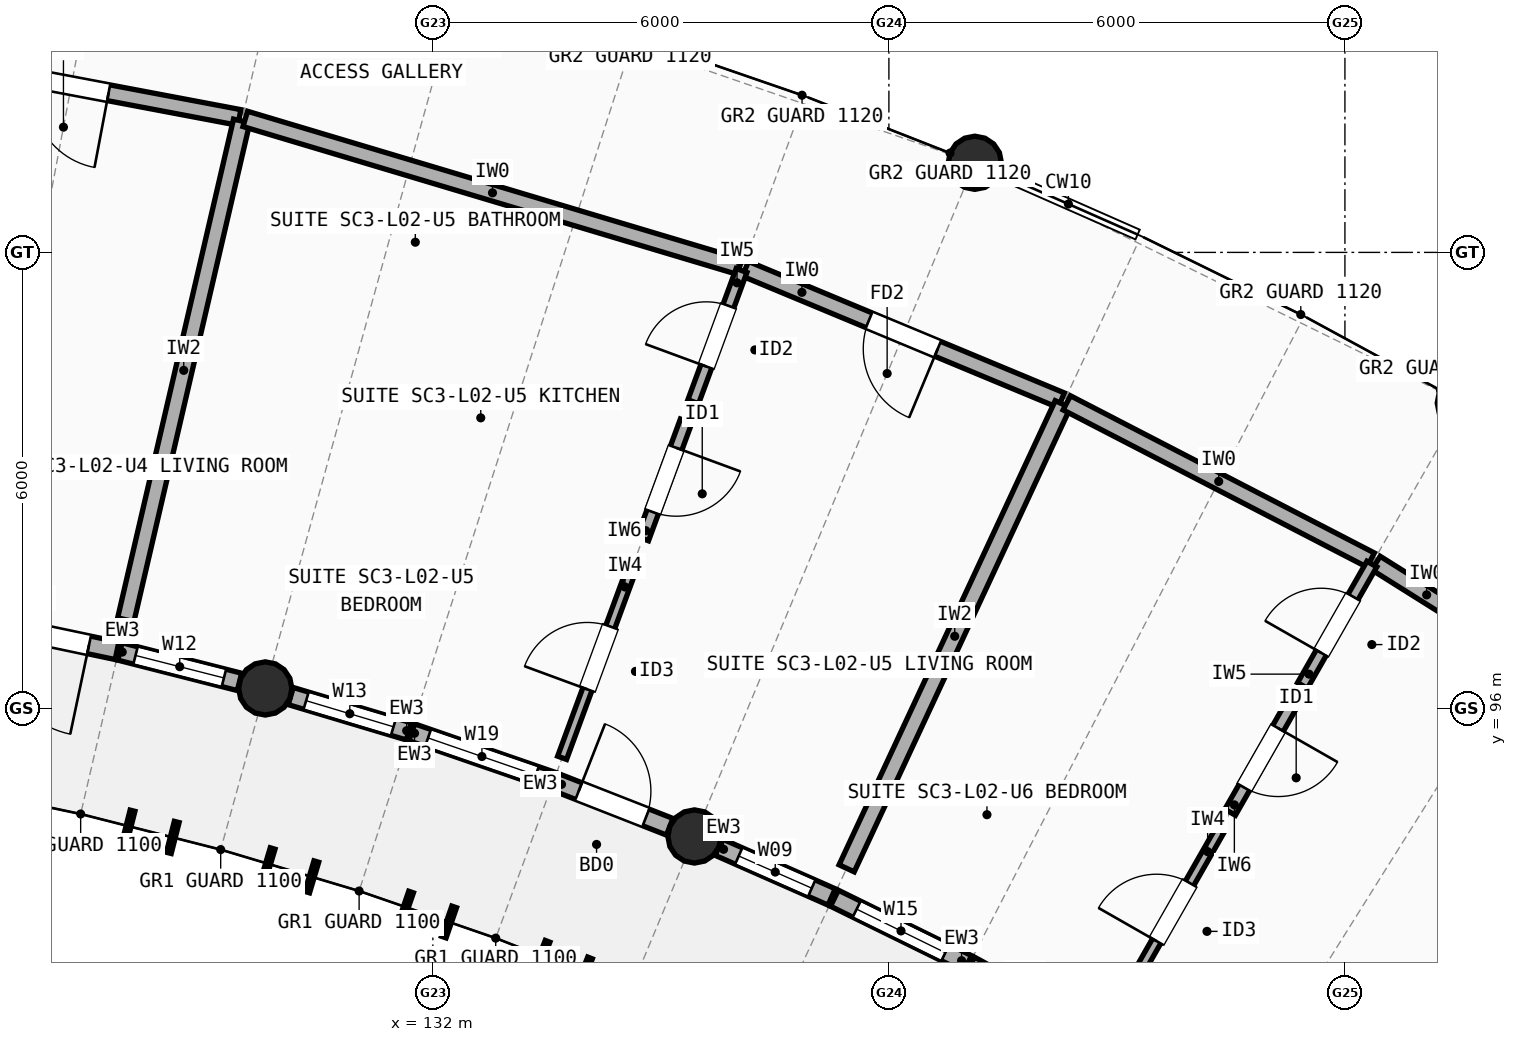
"""IFC4 building model, lengths in metres.
Left out: names, types, materials, properties, quantities, classifications, styles, units other than length and angle.
Written with IfcOpenShell. Run it as: python <this file> out.ifc"""

import sys

from ifc_helpers import new_model, si_unit, direction, frame, frame_2d, origin, origin_2d, place, context, subcontext, project, spatial, rectangle, circle, extrude, element, fill, save


model = new_model("IFC4")
c1 = context("Model", 3, precision=1e-05, world=origin(), true_north=direction((0.0, 1.0)))
c2 = subcontext(c1, "Body", "Model", "MODEL_VIEW")
j1 = project(units=[si_unit("LENGTHUNIT", "METRE"), si_unit("PLANEANGLEUNIT", "RADIAN")], contexts=[c1])
p1 = place(None, origin())
s1 = spatial("IfcSite", under=j1, at=p1, CompositionType="ELEMENT")
p2 = place(p1, origin())
s2 = spatial("IfcBuilding", under=s1, at=p2, CompositionType="ELEMENT")
p3 = place(p2, frame((0.0, 0.0, 7.7)))
s3 = spatial("IfcBuildingStorey", under=s2, at=p3, CompositionType="ELEMENT", Elevation=7.7)
for number, where, z_axis, x_axis in (
    (1, (129.795, 96.263, 0.0), (0.0, 0.0, 1.0), (1.0, 0.0, 0.0)),
    (2, (135.442, 94.316, 0.0), (0.0, 0.0, 1.0), (1.0, 0.0, 0.0)),
    (3, (139.13, 103.179, 0.0), (0.0, 0.0, 1.0), (1.0, 0.0, 0.0)),
    (4, (145.564, 100.018, 0.0), (0.0, 0.0, 1.0), (1.0, 0.0, 0.0)),
):
    element("IfcColumn", number, at=place(p3, frame(where, z_axis=z_axis, x_axis=x_axis)), inside=s3, PredefinedType="COLUMN", context=c2, shape_type="SweptSolid", body=[
        extrude(circle(Radius=0.35, at=origin_2d()), origin(), (0.0, 0.0, 1.0), 2.948),
    ])
p4 = place(p3, frame((125.934, 97.161, 0.0), z_axis=(0.0, 0.0, 1.0), x_axis=(0.978533860292, -0.206086108851, 0.0)))
e5 = element("IfcWall", 5, at=p4, inside=s3, PredefinedType="STANDARD", context=c2, shape_type="SweptSolid", body=[
    extrude(rectangle(XDim=1.952, YDim=0.235, at=frame_2d((0.976, 0.0))), origin(), (0.0, 0.0, 1.0), 2.684),
])
p5 = place(p4, frame((0.376, 0.0, 0.0)))
e6 = element("IfcOpeningElement", 6, at=p5, cuts=e5, PredefinedType="OPENING", context=c2, shape_type="SweptSolid", body=[
    extrude(rectangle(XDim=1.2, YDim=2.15, at=frame_2d((0.6, 1.075))), frame((0.0, 0.127, 0.0), z_axis=(0.0, -1.0, 0.0), x_axis=(1.0, 0.0, 0.0)), (0.0, 0.0, 1.0), 0.255),
])
p6 = place(p3, frame((127.883, 96.75, 0.0), z_axis=(0.0, 0.0, 1.0), x_axis=(0.969142943716, -0.246499400902, 0.0)))
e7 = element("IfcWall", 7, at=p6, inside=s3, PredefinedType="STANDARD", context=c2, shape_type="SweptSolid", body=[
    extrude(rectangle(XDim=1.622, YDim=0.235, at=frame_2d((0.811, 0.0))), origin(), (0.0, 0.0, 1.0), 2.684),
])
p7 = place(p6, frame((0.211, 0.0, 0.85)))
e8 = element("IfcOpeningElement", 8, at=p7, cuts=e7, PredefinedType="OPENING", context=c2, shape_type="SweptSolid", body=[
    extrude(rectangle(XDim=1.2, YDim=1.35, at=frame_2d((0.6, 0.675))), frame((0.0, 0.127, 0.0), z_axis=(0.0, -1.0, 0.0), x_axis=(1.0, 0.0, 0.0)), (0.0, 0.0, 1.0), 0.255),
])
p8 = place(p3, frame((130.13, 96.163, 0.0), z_axis=(0.0, 0.0, 1.0), x_axis=(0.958078548486, -0.286505662999, 0.0)))
e9 = element("IfcWall", 9, at=p8, inside=s3, PredefinedType="STANDARD", context=c2, shape_type="SweptSolid", body=[
    extrude(rectangle(XDim=1.623, YDim=0.235, at=frame_2d((0.811, 0.0))), origin(), (0.0, 0.0, 1.0), 2.684),
])
p9 = place(p8, frame((0.211, 0.0, 0.85)))
e10 = element("IfcOpeningElement", 10, at=p9, cuts=e9, PredefinedType="OPENING", context=c2, shape_type="SweptSolid", body=[
    extrude(rectangle(XDim=1.2, YDim=1.45, at=frame_2d((0.6, 0.725))), frame((0.0, 0.127, 0.0), z_axis=(0.0, -1.0, 0.0), x_axis=(1.0, 0.0, 0.0)), (0.0, 0.0, 1.0), 0.255),
])
p10 = place(p3, frame((131.722, 95.686, 0.0), z_axis=(0.0, 0.0, 1.0), x_axis=(0.945368994877, -0.326002244662, 0.0)))
e11 = element("IfcWall", 11, at=p10, inside=s3, PredefinedType="STANDARD", context=c2, shape_type="SweptSolid", body=[
    extrude(rectangle(XDim=1.952, YDim=0.235, at=frame_2d((0.976, 0.0))), origin(), (0.0, 0.0, 1.0), 2.684),
])
p11 = place(p10, frame((0.226, 0.0, 0.85)))
e12 = element("IfcOpeningElement", 12, at=p11, cuts=e11, PredefinedType="OPENING", context=c2, shape_type="SweptSolid", body=[
    extrude(rectangle(XDim=1.5, YDim=1.5, at=frame_2d((0.75, 0.75))), frame((0.0, 0.127, 0.0), z_axis=(0.0, -1.0, 0.0), x_axis=(1.0, 0.0, 0.0)), (0.0, 0.0, 1.0), 0.255),
])
p12 = place(p3, frame((133.606, 95.036, 0.0), z_axis=(0.0, 0.0, 1.0), x_axis=(0.931038371221, -0.364921294684, 0.0)))
e13 = element("IfcWall", 13, at=p12, inside=s3, PredefinedType="STANDARD", context=c2, shape_type="SweptSolid", body=[
    extrude(rectangle(XDim=1.622, YDim=0.235, at=frame_2d((0.811, 0.0))), origin(), (0.0, 0.0, 1.0), 2.684),
])
p13 = place(p12, frame((0.336, 0.0, 0.0)))
e14 = element("IfcOpeningElement", 14, at=p13, cuts=e13, PredefinedType="OPENING", context=c2, shape_type="SweptSolid", body=[
    extrude(rectangle(XDim=0.95, YDim=2.12, at=frame_2d((0.475, 1.06))), frame((0.0, 0.127, 0.0), z_axis=(0.0, -1.0, 0.0), x_axis=(1.0, 0.0, 0.0)), (0.0, 0.0, 1.0), 0.255),
])
p14 = place(p3, frame((135.762, 94.175, 0.0), z_axis=(0.0, 0.0, 1.0), x_axis=(0.915073009016, -0.403288219727, 0.0)))
e15 = element("IfcWall", 15, at=p14, inside=s3, PredefinedType="STANDARD", context=c2, shape_type="SweptSolid", body=[
    extrude(rectangle(XDim=1.622, YDim=0.235, at=frame_2d((0.811, 0.0))), origin(), (0.0, 0.0, 1.0), 2.684),
])
p15 = place(p14, frame((0.286, 0.0, 0.85)))
e16 = element("IfcOpeningElement", 16, at=p15, cuts=e15, PredefinedType="OPENING", context=c2, shape_type="SweptSolid", body=[
    extrude(rectangle(XDim=1.05, YDim=1.35, at=frame_2d((0.525, 0.675))), frame((0.0, 0.127, 0.0), z_axis=(0.0, -1.0, 0.0), x_axis=(1.0, 0.0, 0.0)), (0.0, 0.0, 1.0), 0.255),
])
p16 = place(p3, frame((137.283, 93.503, 0.0), z_axis=(0.0, 0.0, 1.0), x_axis=(0.897531751182, -0.44094983345, 0.0)))
e17 = element("IfcWall", 17, at=p16, inside=s3, PredefinedType="STANDARD", context=c2, shape_type="SweptSolid", body=[
    extrude(rectangle(XDim=1.952, YDim=0.235, at=frame_2d((0.976, 0.0))), origin(), (0.0, 0.0, 1.0), 2.684),
])
p17 = place(p16, frame((0.326, 0.0, 0.85)))
e18 = element("IfcOpeningElement", 18, at=p17, cuts=e17, PredefinedType="OPENING", context=c2, shape_type="SweptSolid", body=[
    extrude(rectangle(XDim=1.3, YDim=1.45, at=frame_2d((0.65, 0.725))), frame((0.0, 0.127, 0.0), z_axis=(0.0, -1.0, 0.0), x_axis=(1.0, 0.0, 0.0)), (0.0, 0.0, 1.0), 0.255),
])
p18 = place(p3, frame((139.071, 92.624, 0.0), z_axis=(0.0, 0.0, 1.0), x_axis=(0.878452871629, -0.477828999044, 0.0)))
e19 = element("IfcWall", 19, at=p18, inside=s3, PredefinedType="STANDARD", context=c2, shape_type="SweptSolid", body=[
    extrude(rectangle(XDim=1.622, YDim=0.235, at=frame_2d((0.811, 0.0))), origin(), (0.0, 0.0, 1.0), 2.684),
])
p19 = place(p18, frame((0.236, 0.0, 0.85)))
e20 = element("IfcOpeningElement", 20, at=p19, cuts=e19, PredefinedType="OPENING", context=c2, shape_type="SweptSolid", body=[
    extrude(rectangle(XDim=1.15, YDim=1.45, at=frame_2d((0.575, 0.725))), frame((0.0, 0.127, 0.0), z_axis=(0.0, -1.0, 0.0), x_axis=(1.0, 0.0, 0.0)), (0.0, 0.0, 1.0), 0.255),
])
p20 = place(p3, frame((125.031, 104.611, 0.0), z_axis=(0.0, 0.0, 1.0), x_axis=(0.982595404078, -0.18575863879, 0.0)))
e21 = element("IfcWall", 21, at=p20, inside=s3, PredefinedType="SOLIDWALL", context=c2, shape_type="SweptSolid", body=[
    extrude(rectangle(XDim=4.501, YDim=0.21, at=frame_2d((2.251, 0.0))), origin(), (0.0, 0.0, 1.0), 2.762),
])
p21 = place(p20, frame((1.751, 0.0, 0.0)))
e22 = element("IfcOpeningElement", 22, at=p21, cuts=e21, PredefinedType="OPENING", context=c2, shape_type="SweptSolid", body=[
    extrude(rectangle(XDim=1.0, YDim=2.15, at=frame_2d((0.5, 1.075))), frame((0.0, 0.115, 0.0), z_axis=(0.0, -1.0, 0.0), x_axis=(1.0, 0.0, 0.0)), (0.0, 0.0, 1.0), 0.23),
])
p22 = place(p3, frame((127.96, 97.167, 0.0), z_axis=(0.0, 0.0, 1.0), x_axis=(0.226349561734, 0.974046136434, 0.0)))
e23 = element("IfcWall", 23, at=p22, inside=s3, PredefinedType="SOLIDWALL", context=c2, shape_type="SweptSolid", body=[
    extrude(rectangle(XDim=6.736, YDim=0.22, at=frame_2d((3.368, 0.0))), origin(), (0.0, 0.0, 1.0), 2.722),
])
p23 = place(p3, frame((129.532, 103.756, 0.0), z_axis=(0.0, 0.0, 1.0), x_axis=(0.958078275652, -0.286506575357, 0.0)))
e24 = element("IfcWall", 24, at=p23, inside=s3, PredefinedType="SOLIDWALL", context=c2, shape_type="SweptSolid", body=[
    extrude(rectangle(XDim=6.79, YDim=0.21, at=frame_2d((3.395, 0.0))), origin(), (0.0, 0.0, 1.0), 2.742),
])
p24 = place(p3, frame((136.112, 101.784, 0.0), z_axis=(0.0, 0.0, 1.0), x_axis=(0.923267760269, -0.384157054925, 0.0)))
e25 = element("IfcWall", 25, at=p24, inside=s3, PredefinedType="SOLIDWALL", context=c2, shape_type="SweptSolid", body=[
    extrude(rectangle(XDim=4.501, YDim=0.21, at=frame_2d((2.251, 0.0))), origin(), (0.0, 0.0, 1.0), 2.742),
])
p25 = place(p24, frame((1.761, 0.0, 0.0)))
e26 = element("IfcOpeningElement", 26, at=p25, cuts=e25, PredefinedType="OPENING", context=c2, shape_type="SweptSolid", body=[
    extrude(rectangle(XDim=0.98, YDim=2.15, at=frame_2d((0.49, 1.075))), frame((0.0, 0.115, 0.0), z_axis=(0.0, -1.0, 0.0), x_axis=(1.0, 0.0, 0.0)), (0.0, 0.0, 1.0), 0.23),
])
p26 = place(p3, frame((133.7, 95.351, 0.0), z_axis=(0.0, 0.0, 1.0), x_axis=(0.345555846023, 0.938398186954, 0.0)))
e27 = element("IfcWall", 27, at=p26, inside=s3, PredefinedType="PARTITIONING", context=c2, shape_type="SweptSolid", body=[
    extrude(rectangle(XDim=2.8, YDim=0.125, at=frame_2d((1.4, 0.0))), origin(), (0.0, 0.0, 1.0), 2.722),
])
p27 = place(p26, frame((0.96, 0.0, 0.0)))
e28 = element("IfcOpeningElement", 28, at=p27, cuts=e27, PredefinedType="OPENING", context=c2, shape_type="SweptSolid", body=[
    extrude(rectangle(XDim=0.88, YDim=2.1, at=frame_2d((0.44, 1.05))), frame((0.0, 0.073, 0.0), z_axis=(0.0, -1.0, 0.0), x_axis=(1.0, 0.0, 0.0)), (0.0, 0.0, 1.0), 0.145),
])
p28 = place(p3, frame((134.762, 98.233, 0.0), z_axis=(0.0, 0.0, 1.0), x_axis=(0.345581795697, 0.938388630836, 0.0)))
e29 = element("IfcWall", 29, at=p28, inside=s3, PredefinedType="PLUMBINGWALL", context=c2, shape_type="SweptSolid", body=[
    extrude(rectangle(XDim=1.648, YDim=0.16, at=frame_2d((0.824, 0.0))), origin(), (0.0, 0.0, 1.0), 2.722),
])
p29 = place(p28, frame((0.374, 0.0, 0.0)))
e30 = element("IfcOpeningElement", 30, at=p29, cuts=e29, PredefinedType="OPENING", context=c2, shape_type="SweptSolid", body=[
    extrude(rectangle(XDim=0.9, YDim=2.1, at=frame_2d((0.45, 1.05))), frame((0.0, 0.09, 0.0), z_axis=(0.0, -1.0, 0.0), x_axis=(1.0, 0.0, 0.0)), (0.0, 0.0, 1.0), 0.18),
])
p30 = place(p3, frame((135.426, 100.035, 0.0), z_axis=(0.0, 0.0, 1.0), x_axis=(0.345490154584, 0.938422374566, 0.0)))
e31 = element("IfcWall", 31, at=p30, inside=s3, PredefinedType="PARTITIONING", context=c2, shape_type="SweptSolid", body=[
    extrude(rectangle(XDim=1.84, YDim=0.15, at=frame_2d((0.92, 0.0))), origin(), (0.0, 0.0, 1.0), 2.722),
])
p31 = place(p30, frame((0.495, 0.0, 0.0)))
e32 = element("IfcOpeningElement", 32, at=p31, cuts=e31, PredefinedType="OPENING", context=c2, shape_type="SweptSolid", body=[
    extrude(rectangle(XDim=0.85, YDim=2.1, at=frame_2d((0.425, 1.05))), frame((0.0, 0.085, 0.0), z_axis=(0.0, -1.0, 0.0), x_axis=(1.0, 0.0, 0.0)), (0.0, 0.0, 1.0), 0.17),
])
p32 = place(p3, frame((137.444, 93.897, 0.0), z_axis=(0.0, 0.0, 1.0), x_axis=(0.422206763189, 0.906499558256, 0.0)))
e33 = element("IfcWall", 33, at=p32, inside=s3, PredefinedType="SOLIDWALL", context=c2, shape_type="SweptSolid", body=[
    extrude(rectangle(XDim=6.736, YDim=0.22, at=frame_2d((3.368, 0.0))), origin(), (0.0, 0.0, 1.0), 2.762),
])
p33 = place(p3, frame((140.34, 100.021, 0.0), z_axis=(0.0, 0.0, 1.0), x_axis=(0.888214590482, -0.459428820662, 0.0)))
e34 = element("IfcWall", 34, at=p33, inside=s3, PredefinedType="SOLIDWALL", context=c2, shape_type="SweptSolid", body=[
    extrude(rectangle(XDim=4.501, YDim=0.21, at=frame_2d((2.251, 0.0))), origin(), (0.0, 0.0, 1.0), 2.722),
])
p34 = place(p3, frame((144.408, 97.913, 0.0), z_axis=(0.0, 0.0, 1.0), x_axis=(0.847037081085, -0.531533802563, 0.0)))
e35 = element("IfcWall", 35, at=p34, inside=s3, PredefinedType="SOLIDWALL", context=c2, shape_type="SweptSolid", body=[
    extrude(rectangle(XDim=4.501, YDim=0.21, at=frame_2d((2.25, 0.0))), origin(), (0.0, 0.0, 1.0), 2.762),
])
p35 = place(p34, frame((1.726, 0.0, 0.0)))
e36 = element("IfcOpeningElement", 36, at=p35, cuts=e35, PredefinedType="OPENING", context=c2, shape_type="SweptSolid", body=[
    extrude(rectangle(XDim=1.05, YDim=2.15, at=frame_2d((0.525, 1.075))), frame((0.0, 0.115, 0.0), z_axis=(0.0, -1.0, 0.0), x_axis=(1.0, 0.0, 0.0)), (0.0, 0.0, 1.0), 0.23),
])
p36 = place(p3, frame((141.125, 92.245, 0.0), z_axis=(0.0, 0.0, 1.0), x_axis=(0.49594810138, 0.868352164008, 0.0)))
e37 = element("IfcWall", 37, at=p36, inside=s3, PredefinedType="PARTITIONING", context=c2, shape_type="SweptSolid", body=[
    extrude(rectangle(XDim=2.48, YDim=0.125, at=frame_2d((1.24, 0.0))), origin(), (0.0, 0.0, 1.0), 2.742),
])
p37 = place(p36, frame((0.8, 0.0, 0.0)))
e38 = element("IfcOpeningElement", 38, at=p37, cuts=e37, PredefinedType="OPENING", context=c2, shape_type="SweptSolid", body=[
    extrude(rectangle(XDim=0.88, YDim=2.1, at=frame_2d((0.44, 1.05))), frame((0.0, 0.073, 0.0), z_axis=(0.0, -1.0, 0.0), x_axis=(1.0, 0.0, 0.0)), (0.0, 0.0, 1.0), 0.145),
])
p38 = place(p3, frame((142.49, 94.635, 0.0), z_axis=(0.0, 0.0, 1.0), x_axis=(0.49583578404, 0.868416302971, 0.0)))
e39 = element("IfcWall", 39, at=p38, inside=s3, PredefinedType="PLUMBINGWALL", context=c2, shape_type="SweptSolid", body=[
    extrude(rectangle(XDim=1.648, YDim=0.16, at=frame_2d((0.824, 0.0))), origin(), (0.0, 0.0, 1.0), 2.742),
])
p39 = place(p38, frame((0.374, 0.0, 0.0)))
e40 = element("IfcOpeningElement", 40, at=p39, cuts=e39, PredefinedType="OPENING", context=c2, shape_type="SweptSolid", body=[
    extrude(rectangle(XDim=0.9, YDim=2.1, at=frame_2d((0.45, 1.05))), frame((0.0, 0.09, 0.0), z_axis=(0.0, -1.0, 0.0), x_axis=(1.0, 0.0, 0.0)), (0.0, 0.0, 1.0), 0.18),
])
p40 = place(p3, frame((143.442, 96.302, 0.0), z_axis=(0.0, 0.0, 1.0), x_axis=(0.495938892217, 0.868357423638, 0.0)))
e41 = element("IfcWall", 41, at=p40, inside=s3, PredefinedType="PARTITIONING", context=c2, shape_type="SweptSolid", body=[
    extrude(rectangle(XDim=1.84, YDim=0.15, at=frame_2d((0.92, 0.0))), origin(), (0.0, 0.0, 1.0), 2.742),
])
p41 = place(p40, frame((0.495, 0.0, 0.0)))
e42 = element("IfcOpeningElement", 42, at=p41, cuts=e41, PredefinedType="OPENING", context=c2, shape_type="SweptSolid", body=[
    extrude(rectangle(XDim=0.85, YDim=2.1, at=frame_2d((0.425, 1.05))), frame((0.0, 0.085, 0.0), z_axis=(0.0, -1.0, 0.0), x_axis=(1.0, 0.0, 0.0)), (0.0, 0.0, 1.0), 0.17),
])
p42 = place(p5, frame((1.2, 0.0, 0.0), z_axis=(0.0, 0.0, 1.0), x_axis=(-1.0, 0.0, 0.0)))
e43 = element("IfcDoor", 43, at=p42, inside=s3, OperationType="SINGLE_SWING_RIGHT", PredefinedType="DOOR", context=c2, shape_type="SweptSolid", body=[
    extrude(rectangle(XDim=1.2, YDim=2.15, at=frame_2d((0.6, 1.075))), frame((0.0, 0.025, 0.0), z_axis=(0.0, -1.0, 0.0), x_axis=(1.0, 0.0, 0.0)), (0.0, 0.0, 1.0), 0.05),
])
fill(e6, e43)
p43 = place(p7, origin())
e44 = element("IfcWindow", 44, at=p43, inside=s3, PartitioningType="SINGLE_PANEL", PredefinedType="WINDOW", context=c2, shape_type="SweptSolid", body=[
    extrude(rectangle(XDim=1.2, YDim=1.35, at=frame_2d((0.6, 0.675))), frame((0.0, 0.03, 0.0), z_axis=(0.0, -1.0, 0.0), x_axis=(1.0, 0.0, 0.0)), (0.0, 0.0, 1.0), 0.06),
])
fill(e8, e44)
p44 = place(p9, origin())
e45 = element("IfcWindow", 45, at=p44, inside=s3, PartitioningType="SINGLE_PANEL", PredefinedType="WINDOW", context=c2, shape_type="SweptSolid", body=[
    extrude(rectangle(XDim=1.2, YDim=1.45, at=frame_2d((0.6, 0.725))), frame((0.0, 0.03, 0.0), z_axis=(0.0, -1.0, 0.0), x_axis=(1.0, 0.0, 0.0)), (0.0, 0.0, 1.0), 0.06),
])
fill(e10, e45)
p45 = place(p11, origin())
e46 = element("IfcWindow", 46, at=p45, inside=s3, PartitioningType="SINGLE_PANEL", PredefinedType="WINDOW", context=c2, shape_type="SweptSolid", body=[
    extrude(rectangle(XDim=1.5, YDim=1.5, at=frame_2d((0.75, 0.75))), frame((0.0, 0.03, 0.0), z_axis=(0.0, -1.0, 0.0), x_axis=(1.0, 0.0, 0.0)), (0.0, 0.0, 1.0), 0.06),
])
fill(e12, e46)
p46 = place(p13, frame((0.95, 0.0, 0.0), z_axis=(0.0, 0.0, 1.0), x_axis=(-1.0, 0.0, 0.0)))
e47 = element("IfcDoor", 47, at=p46, inside=s3, OperationType="SINGLE_SWING_LEFT", PredefinedType="DOOR", context=c2, shape_type="SweptSolid", body=[
    extrude(rectangle(XDim=0.95, YDim=2.12, at=frame_2d((0.475, 1.06))), frame((0.0, 0.025, 0.0), z_axis=(0.0, -1.0, 0.0), x_axis=(1.0, 0.0, 0.0)), (0.0, 0.0, 1.0), 0.05),
])
fill(e14, e47)
p47 = place(p15, origin())
e48 = element("IfcWindow", 48, at=p47, inside=s3, PartitioningType="SINGLE_PANEL", PredefinedType="WINDOW", context=c2, shape_type="SweptSolid", body=[
    extrude(rectangle(XDim=1.05, YDim=1.35, at=frame_2d((0.525, 0.675))), frame((0.0, 0.03, 0.0), z_axis=(0.0, -1.0, 0.0), x_axis=(1.0, 0.0, 0.0)), (0.0, 0.0, 1.0), 0.06),
])
fill(e16, e48)
p48 = place(p17, origin())
e49 = element("IfcWindow", 49, at=p48, inside=s3, PartitioningType="SINGLE_PANEL", PredefinedType="WINDOW", context=c2, shape_type="SweptSolid", body=[
    extrude(rectangle(XDim=1.3, YDim=1.45, at=frame_2d((0.65, 0.725))), frame((0.0, 0.03, 0.0), z_axis=(0.0, -1.0, 0.0), x_axis=(1.0, 0.0, 0.0)), (0.0, 0.0, 1.0), 0.06),
])
fill(e18, e49)
p49 = place(p21, origin())
e50 = element("IfcDoor", 50, at=p49, inside=s3, OperationType="SINGLE_SWING_RIGHT", PredefinedType="DOOR", context=c2, shape_type="SweptSolid", body=[
    extrude(rectangle(XDim=1.0, YDim=2.15, at=frame_2d((0.5, 1.075))), frame((0.0, 0.025, 0.0), z_axis=(0.0, -1.0, 0.0), x_axis=(1.0, 0.0, 0.0)), (0.0, 0.0, 1.0), 0.05),
])
fill(e22, e50)
p50 = place(p25, origin())
e51 = element("IfcDoor", 51, at=p50, inside=s3, OperationType="SINGLE_SWING_RIGHT", PredefinedType="DOOR", context=c2, shape_type="SweptSolid", body=[
    extrude(rectangle(XDim=0.98, YDim=2.15, at=frame_2d((0.49, 1.075))), frame((0.0, 0.025, 0.0), z_axis=(0.0, -1.0, 0.0), x_axis=(1.0, 0.0, 0.0)), (0.0, 0.0, 1.0), 0.05),
])
fill(e26, e51)
p51 = place(p27, origin())
e52 = element("IfcDoor", 52, at=p51, inside=s3, OperationType="SINGLE_SWING_LEFT", PredefinedType="DOOR", context=c2, shape_type="SweptSolid", body=[
    extrude(rectangle(XDim=0.88, YDim=2.1, at=frame_2d((0.44, 1.05))), frame((0.0, 0.025, 0.0), z_axis=(0.0, -1.0, 0.0), x_axis=(1.0, 0.0, 0.0)), (0.0, 0.0, 1.0), 0.05),
])
fill(e28, e52)
p52 = place(p29, origin())
e53 = element("IfcDoor", 53, at=p52, inside=s3, OperationType="SINGLE_SWING_RIGHT", PredefinedType="DOOR", context=c2, shape_type="SweptSolid", body=[
    extrude(rectangle(XDim=0.9, YDim=2.1, at=frame_2d((0.45, 1.05))), frame((0.0, 0.025, 0.0), z_axis=(0.0, -1.0, 0.0), x_axis=(1.0, 0.0, 0.0)), (0.0, 0.0, 1.0), 0.05),
])
fill(e30, e53)
p53 = place(p31, origin())
e54 = element("IfcDoor", 54, at=p53, inside=s3, OperationType="SINGLE_SWING_LEFT", PredefinedType="DOOR", context=c2, shape_type="SweptSolid", body=[
    extrude(rectangle(XDim=0.85, YDim=2.1, at=frame_2d((0.425, 1.05))), frame((0.0, 0.025, 0.0), z_axis=(0.0, -1.0, 0.0), x_axis=(1.0, 0.0, 0.0)), (0.0, 0.0, 1.0), 0.05),
])
fill(e32, e54)
p54 = place(p37, origin())
e55 = element("IfcDoor", 55, at=p54, inside=s3, OperationType="SINGLE_SWING_LEFT", PredefinedType="DOOR", context=c2, shape_type="SweptSolid", body=[
    extrude(rectangle(XDim=0.88, YDim=2.1, at=frame_2d((0.44, 1.05))), frame((0.0, 0.025, 0.0), z_axis=(0.0, -1.0, 0.0), x_axis=(1.0, 0.0, 0.0)), (0.0, 0.0, 1.0), 0.05),
])
fill(e38, e55)
p55 = place(p39, origin())
e56 = element("IfcDoor", 56, at=p55, inside=s3, OperationType="SINGLE_SWING_RIGHT", PredefinedType="DOOR", context=c2, shape_type="SweptSolid", body=[
    extrude(rectangle(XDim=0.9, YDim=2.1, at=frame_2d((0.45, 1.05))), frame((0.0, 0.025, 0.0), z_axis=(0.0, -1.0, 0.0), x_axis=(1.0, 0.0, 0.0)), (0.0, 0.0, 1.0), 0.05),
])
fill(e40, e56)
p56 = place(p41, origin())
e57 = element("IfcDoor", 57, at=p56, inside=s3, OperationType="SINGLE_SWING_LEFT", PredefinedType="DOOR", context=c2, shape_type="SweptSolid", body=[
    extrude(rectangle(XDim=0.85, YDim=2.1, at=frame_2d((0.425, 1.05))), frame((0.0, 0.025, 0.0), z_axis=(0.0, -1.0, 0.0), x_axis=(1.0, 0.0, 0.0)), (0.0, 0.0, 1.0), 0.05),
])
fill(e42, e57)
save(model, sys.argv[1])
